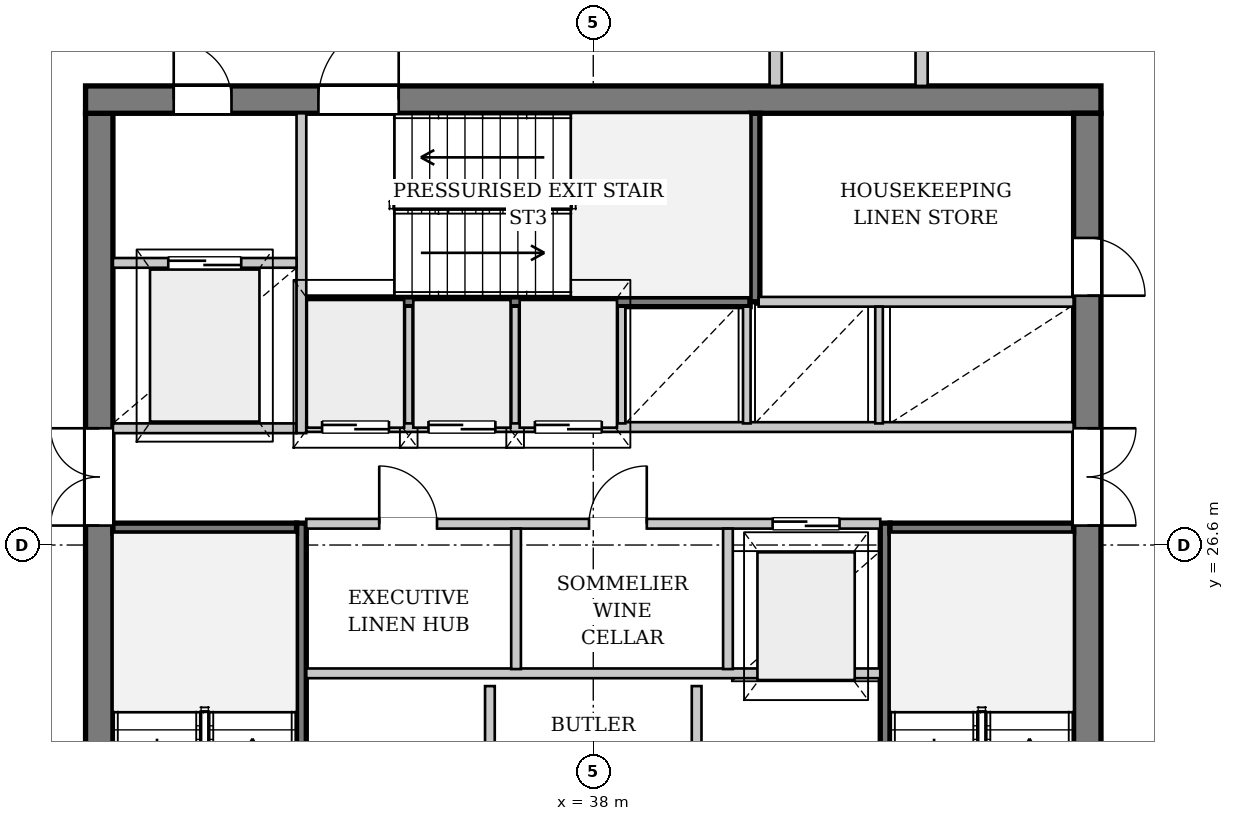
"""IFC4 building model, lengths in metres.
Left out: names, types, materials, properties, quantities, classifications, styles, units other than length and angle.
Written with IfcOpenShell. Run it as: python <this file> out.ifc"""

import sys

from ifc_helpers import new_model, si_unit, direction, frame, frame_2d, origin, place, context, subcontext, project, spatial, rectangle, extrude, source, transform, mapped, element, fill, save


model = new_model("IFC4")
c1 = context("Model", 3, precision=1e-05, world=origin(), true_north=direction((0.0, 1.0)))
c2 = subcontext(c1, "Body", "Model", "MODEL_VIEW")
j1 = project(units=[si_unit("LENGTHUNIT", "METRE"), si_unit("PLANEANGLEUNIT", "RADIAN")], contexts=[c1])
p1 = place(None, origin())
s1 = spatial("IfcSite", under=j1, at=p1, CompositionType="ELEMENT")
p2 = place(p1, origin())
s2 = spatial("IfcBuilding", under=s1, at=p2, CompositionType="ELEMENT")
p3 = place(p2, frame((0.0, 0.0, 220.25)))
s3 = spatial("IfcBuildingStorey", under=s2, at=p3, CompositionType="ELEMENT", Elevation=220.25)
p4 = place(p3, frame((52.95, 23.555, 0.0), z_axis=(0.0, 0.0, 1.0), x_axis=(-0.475160220621, -0.879899292385, 0.0)))
e1 = element("IfcWall", 1, at=p4, inside=s3, PredefinedType="SOLIDWALL", context=c2, shape_type="SweptSolid", body=[
    extrude(rectangle(XDim=23.072, YDim=0.32, at=frame_2d((11.536, 0.0))), origin(), (0.0, 0.0, 1.0), 2.822),
])
p5 = place(p4, frame((6.633, 0.0, 0.0)))
e2 = element("IfcOpeningElement", 2, at=p5, cuts=e1, PredefinedType="OPENING", context=c2, shape_type="SweptSolid", body=[
    extrude(rectangle(XDim=1.5, YDim=2.3, at=frame_2d((0.75, 1.15))), frame((0.0, 0.17, 0.0), z_axis=(0.0, -1.0, 0.0), x_axis=(1.0, 0.0, 0.0)), (0.0, 0.0, 1.0), 0.34),
])
p6 = place(p4, frame((15.773, 0.0, 0.352)))
e3 = element("IfcOpeningElement", 3, at=p6, cuts=e1, PredefinedType="OPENING", context=c2, shape_type="SweptSolid", body=[
    extrude(rectangle(XDim=2.6, YDim=2.35, at=frame_2d((1.3, 1.175))), frame((0.0, 0.17, 0.0), z_axis=(0.0, -1.0, 0.0), x_axis=(1.0, 0.0, 0.0)), (0.0, 0.0, 1.0), 0.34),
])
p7 = place(p3, frame((15.696, 32.1, 0.0), z_axis=(0.0, 0.0, 1.0), x_axis=(0.89709423073, 0.441839270766, 0.0)))
e4 = element("IfcWall", 4, at=p7, inside=s3, PredefinedType="SOLIDWALL", context=c2, shape_type="SweptSolid", body=[
    extrude(rectangle(XDim=22.511, YDim=0.38, at=frame_2d((11.255, 0.0))), origin(), (0.0, 0.0, 1.0), 2.822),
])
p8 = place(p7, frame((5.653, 0.0, 0.452)))
e5 = element("IfcOpeningElement", 5, at=p8, cuts=e4, PredefinedType="OPENING", context=c2, shape_type="SweptSolid", body=[
    extrude(rectangle(XDim=2.2, YDim=2.25, at=frame_2d((1.1, 1.125))), frame((0.0, 0.2, 0.0), z_axis=(0.0, -1.0, 0.0), x_axis=(1.0, 0.0, 0.0)), (0.0, 0.0, 1.0), 0.4),
])
p9 = place(p7, frame((15.108, 0.0, 0.452)))
e6 = element("IfcOpeningElement", 6, at=p9, cuts=e4, PredefinedType="OPENING", context=c2, shape_type="SweptSolid", body=[
    extrude(rectangle(XDim=2.2, YDim=2.25, at=frame_2d((1.1, 1.125))), frame((0.0, 0.2, 0.0), z_axis=(0.0, -1.0, 0.0), x_axis=(1.0, 0.0, 0.0)), (0.0, 0.0, 1.0), 0.4),
])
p10 = place(p3, frame((29.875, 19.5, 0.0), z_axis=(0.0, 0.0, 1.0), x_axis=(0.0, 1.0, 0.0)))
e7 = element("IfcWall", 7, at=p10, inside=s3, PredefinedType="SHEAR", context=c2, shape_type="SweptSolid", body=[
    extrude(rectangle(XDim=14.2, YDim=0.45, at=frame_2d((7.1, 0.0))), origin(), (0.0, 0.0, 1.0), 3.33),
])
p11 = place(p10, frame((7.42, 0.0, 0.0)))
e8 = element("IfcOpeningElement", 8, at=p11, cuts=e7, PredefinedType="OPENING", context=c2, shape_type="SweptSolid", body=[
    extrude(rectangle(XDim=1.6, YDim=2.2, at=frame_2d((0.8, 1.1))), frame((0.0, 0.235, 0.0), z_axis=(0.0, -1.0, 0.0), x_axis=(1.0, 0.0, 0.0)), (0.0, 0.0, 1.0), 0.47),
])
p12 = place(p3, frame((29.65, 33.925, 0.0), z_axis=(0.0, 0.0, 1.0), x_axis=(1.0, 0.0, 0.0)))
e9 = element("IfcWall", 9, at=p12, inside=s3, PredefinedType="SHEAR", context=c2, shape_type="SweptSolid", body=[
    extrude(rectangle(XDim=16.7, YDim=0.45, at=frame_2d((8.35, 0.0))), origin(), (0.0, 0.0, 1.0), 3.33),
])
p13 = place(p12, frame((1.45, 0.0, 0.0)))
e10 = element("IfcOpeningElement", 10, at=p13, cuts=e9, PredefinedType="OPENING", context=c2, shape_type="SweptSolid", body=[
    extrude(rectangle(XDim=0.95, YDim=2.1, at=frame_2d((0.475, 1.05))), frame((0.0, 0.235, 0.0), z_axis=(0.0, -1.0, 0.0), x_axis=(1.0, 0.0, 0.0)), (0.0, 0.0, 1.0), 0.47),
])
p14 = place(p12, frame((3.83, 0.0, 0.0)))
e11 = element("IfcOpeningElement", 11, at=p14, cuts=e9, PredefinedType="OPENING", context=c2, shape_type="SweptSolid", body=[
    extrude(rectangle(XDim=1.32, YDim=2.2, at=frame_2d((0.66, 1.1))), frame((0.0, 0.235, 0.0), z_axis=(0.0, -1.0, 0.0), x_axis=(1.0, 0.0, 0.0)), (0.0, 0.0, 1.0), 0.47),
])
p15 = place(p3, frame((46.125, 33.7, 0.0), z_axis=(0.0, 0.0, 1.0), x_axis=(0.0, -1.0, 0.0)))
e12 = element("IfcWall", 12, at=p15, inside=s3, PredefinedType="SHEAR", context=c2, shape_type="SweptSolid", body=[
    extrude(rectangle(XDim=14.2, YDim=0.45, at=frame_2d((7.1, 0.0))), origin(), (0.0, 0.0, 1.0), 3.33),
])
p16 = place(p15, frame((5.18, 0.0, 0.0)))
e13 = element("IfcOpeningElement", 13, at=p16, cuts=e12, PredefinedType="OPENING", context=c2, shape_type="SweptSolid", body=[
    extrude(rectangle(XDim=1.6, YDim=2.2, at=frame_2d((0.8, 1.1))), frame((0.0, 0.235, 0.0), z_axis=(0.0, -1.0, 0.0), x_axis=(1.0, 0.0, 0.0)), (0.0, 0.0, 1.0), 0.47),
])
p17 = place(p15, frame((2.05, 0.0, 0.0)))
e14 = element("IfcOpeningElement", 14, at=p17, cuts=e12, PredefinedType="OPENING", context=c2, shape_type="SweptSolid", body=[
    extrude(rectangle(XDim=0.95, YDim=2.1, at=frame_2d((0.475, 1.05))), frame((0.0, 0.235, 0.0), z_axis=(0.0, -1.0, 0.0), x_axis=(1.0, 0.0, 0.0)), (0.0, 0.0, 1.0), 0.47),
])
p18 = place(p3, frame((33.2, 19.5, 0.0), z_axis=(0.0, 0.0, 1.0), x_axis=(0.0, 1.0, 0.0)))
e15 = element("IfcWall", 15, at=p18, inside=s3, PredefinedType="PARTITIONING", context=c2, shape_type="SweptSolid", body=[
    extrude(rectangle(XDim=7.46, YDim=0.16, at=frame_2d((3.73, 0.0))), origin(), (0.0, 0.0, 1.0), 3.33),
])
p19 = place(p18, frame((0.08, 0.0, 0.0)))
e16 = element("IfcOpeningElement", 16, at=p19, cuts=e15, PredefinedType="OPENING", context=c2, shape_type="SweptSolid", body=[
    extrude(rectangle(XDim=1.32, YDim=2.2, at=frame_2d((0.66, 1.1))), frame((0.0, 0.09, 0.0), z_axis=(0.0, -1.0, 0.0), x_axis=(1.0, 0.0, 0.0)), (0.0, 0.0, 1.0), 0.18),
])
p20 = place(p3, frame((30.1, 26.88, 0.0), z_axis=(0.0, 0.0, 1.0), x_axis=(1.0, 0.0, 0.0)))
e17 = element("IfcWall", 17, at=p20, inside=s3, PredefinedType="PARTITIONING", context=c2, shape_type="SweptSolid", body=[
    extrude(rectangle(XDim=3.02, YDim=0.16, at=frame_2d((1.51, 0.0))), origin(), (0.0, 0.0, 1.0), 3.33),
])
p21 = place(p3, frame((42.8, 26.96, 0.0), z_axis=(0.0, 0.0, 1.0), x_axis=(0.0, -1.0, 0.0)))
e18 = element("IfcWall", 18, at=p21, inside=s3, PredefinedType="PARTITIONING", context=c2, shape_type="SweptSolid", body=[
    extrude(rectangle(XDim=7.46, YDim=0.16, at=frame_2d((3.73, 0.0))), origin(), (0.0, 0.0, 1.0), 3.33),
])
p22 = place(p21, frame((6.06, 0.0, 0.0)))
e19 = element("IfcOpeningElement", 19, at=p22, cuts=e18, PredefinedType="OPENING", context=c2, shape_type="SweptSolid", body=[
    extrude(rectangle(XDim=1.32, YDim=2.2, at=frame_2d((0.66, 1.1))), frame((0.0, 0.09, 0.0), z_axis=(0.0, -1.0, 0.0), x_axis=(1.0, 0.0, 0.0)), (0.0, 0.0, 1.0), 0.18),
])
p23 = place(p3, frame((42.88, 26.88, 0.0), z_axis=(0.0, 0.0, 1.0), x_axis=(1.0, 0.0, 0.0)))
e20 = element("IfcWall", 20, at=p23, inside=s3, PredefinedType="PARTITIONING", context=c2, shape_type="SweptSolid", body=[
    extrude(rectangle(XDim=3.02, YDim=0.16, at=frame_2d((1.51, 0.0))), origin(), (0.0, 0.0, 1.0), 3.33),
])
p24 = place(p3, frame((33.28, 30.6, 0.0), z_axis=(0.0, 0.0, 1.0), x_axis=(1.0, 0.0, 0.0)))
e21 = element("IfcWall", 21, at=p24, inside=s3, PredefinedType="PARTITIONING", context=c2, shape_type="SweptSolid", body=[
    extrude(rectangle(XDim=7.3, YDim=0.16, at=frame_2d((3.65, 0.0))), origin(), (0.0, 0.0, 1.0), 3.33),
])
p25 = place(p3, frame((40.66, 30.6, 0.0), z_axis=(0.0, 0.0, 1.0), x_axis=(0.0, 1.0, 0.0)))
e22 = element("IfcWall", 22, at=p25, inside=s3, PredefinedType="PARTITIONING", context=c2, shape_type="SweptSolid", body=[
    extrude(rectangle(XDim=3.1, YDim=0.16, at=frame_2d((1.55, 0.0))), origin(), (0.0, 0.0, 1.0), 3.33),
])
p26 = place(p3, frame((36.3, 19.5, 0.0), z_axis=(0.0, 0.0, 1.0), x_axis=(0.0, 1.0, 0.0)))
e23 = element("IfcWall", 23, at=p26, inside=s3, PredefinedType="PARTITIONING", context=c2, shape_type="SweptSolid", body=[
    extrude(rectangle(XDim=4.78, YDim=0.16, at=frame_2d((2.39, 0.0))), origin(), (0.0, 0.0, 1.0), 3.33),
])
p27 = place(p26, frame((0.6, 0.0, 0.0)))
e24 = element("IfcOpeningElement", 24, at=p27, cuts=e23, PredefinedType="OPENING", context=c2, shape_type="SweptSolid", body=[
    extrude(rectangle(XDim=1.2, YDim=2.2, at=frame_2d((0.6, 1.1))), frame((0.0, 0.09, 0.0), z_axis=(0.0, -1.0, 0.0), x_axis=(1.0, 0.0, 0.0)), (0.0, 0.0, 1.0), 0.18),
])
p28 = place(p26, frame((2.65, 0.0, 0.0)))
e25 = element("IfcOpeningElement", 25, at=p28, cuts=e23, PredefinedType="OPENING", context=c2, shape_type="SweptSolid", body=[
    extrude(rectangle(XDim=0.95, YDim=2.1, at=frame_2d((0.475, 1.05))), frame((0.0, 0.09, 0.0), z_axis=(0.0, -1.0, 0.0), x_axis=(1.0, 0.0, 0.0)), (0.0, 0.0, 1.0), 0.18),
])
p29 = place(p3, frame((39.7, 24.28, 0.0), z_axis=(0.0, 0.0, 1.0), x_axis=(0.0, -1.0, 0.0)))
e26 = element("IfcWall", 26, at=p29, inside=s3, PredefinedType="PARTITIONING", context=c2, shape_type="SweptSolid", body=[
    extrude(rectangle(XDim=4.78, YDim=0.16, at=frame_2d((2.39, 0.0))), origin(), (0.0, 0.0, 1.0), 3.33),
])
p30 = place(p29, frame((3.12, 0.0, 0.0)))
e27 = element("IfcOpeningElement", 27, at=p30, cuts=e26, PredefinedType="OPENING", context=c2, shape_type="SweptSolid", body=[
    extrude(rectangle(XDim=1.2, YDim=2.2, at=frame_2d((0.6, 1.1))), frame((0.0, 0.09, 0.0), z_axis=(0.0, -1.0, 0.0), x_axis=(1.0, 0.0, 0.0)), (0.0, 0.0, 1.0), 0.18),
])
p31 = place(p3, frame((33.28, 24.49, 0.0), z_axis=(0.0, 0.0, 1.0), x_axis=(1.0, 0.0, 0.0)))
e28 = element("IfcWall", 28, at=p31, inside=s3, PredefinedType="PARTITIONING", context=c2, shape_type="SweptSolid", body=[
    extrude(rectangle(XDim=9.44, YDim=0.16, at=frame_2d((4.72, 0.0))), origin(), (0.0, 0.0, 1.0), 3.33),
])
p32 = place(p3, frame((30.1, 28.52, 0.0), z_axis=(0.0, 0.0, 1.0), x_axis=(1.0, 0.0, 0.0)))
e29 = element("IfcWall", 29, at=p32, inside=s3, PredefinedType="PARTITIONING", context=c2, shape_type="SweptSolid", body=[
    extrude(rectangle(XDim=3.02, YDim=0.16, at=frame_2d((1.51, 0.0))), origin(), (0.0, 0.0, 1.0), 3.33),
])
p33 = place(p3, frame((33.2, 28.44, 0.0), z_axis=(0.0, 0.0, 1.0), x_axis=(0.0, 1.0, 0.0)))
e30 = element("IfcWall", 30, at=p33, inside=s3, PredefinedType="PARTITIONING", context=c2, shape_type="SweptSolid", body=[
    extrude(rectangle(XDim=5.26, YDim=0.16, at=frame_2d((2.63, 0.0))), origin(), (0.0, 0.0, 1.0), 3.33),
])
p34 = place(p3, frame((30.1, 31.24, 0.0), z_axis=(0.0, 0.0, 1.0), x_axis=(1.0, 0.0, 0.0)))
e31 = element("IfcWall", 31, at=p34, inside=s3, PredefinedType="PARTITIONING", context=c2, shape_type="SweptSolid", body=[
    extrude(rectangle(XDim=3.02, YDim=0.16, at=frame_2d((1.51, 0.0))), origin(), (0.0, 0.0, 1.0), 3.33),
])
p35 = place(p34, frame((0.91, 0.0, 0.0)))
e32 = element("IfcOpeningElement", 32, at=p35, cuts=e31, PredefinedType="OPENING", context=c2, shape_type="SweptSolid", body=[
    extrude(rectangle(XDim=1.2, YDim=2.2, at=frame_2d((0.6, 1.1))), frame((0.0, 0.09, 0.0), z_axis=(0.0, -1.0, 0.0), x_axis=(1.0, 0.0, 0.0)), (0.0, 0.0, 1.0), 0.18),
])
p36 = place(p3, frame((33.28, 26.95, 0.0), z_axis=(0.0, 0.0, 1.0), x_axis=(1.0, 0.0, 0.0)))
e33 = element("IfcWall", 33, at=p36, inside=s3, PredefinedType="PARTITIONING", context=c2, shape_type="SweptSolid", body=[
    extrude(rectangle(XDim=9.44, YDim=0.16, at=frame_2d((4.72, 0.0))), origin(), (0.0, 0.0, 1.0), 3.33),
])
p37 = place(p36, frame((1.2, 0.0, 0.0)))
e34 = element("IfcOpeningElement", 34, at=p37, cuts=e33, PredefinedType="OPENING", context=c2, shape_type="SweptSolid", body=[
    extrude(rectangle(XDim=0.95, YDim=2.1, at=frame_2d((0.475, 1.05))), frame((0.0, 0.09, 0.0), z_axis=(0.0, -1.0, 0.0), x_axis=(1.0, 0.0, 0.0)), (0.0, 0.0, 1.0), 0.18),
])
p38 = place(p36, frame((4.65, 0.0, 0.0)))
e35 = element("IfcOpeningElement", 35, at=p38, cuts=e33, PredefinedType="OPENING", context=c2, shape_type="SweptSolid", body=[
    extrude(rectangle(XDim=0.95, YDim=2.1, at=frame_2d((0.475, 1.05))), frame((0.0, 0.09, 0.0), z_axis=(0.0, -1.0, 0.0), x_axis=(1.0, 0.0, 0.0)), (0.0, 0.0, 1.0), 0.18),
])
p39 = place(p36, frame((7.67, 0.0, 0.0)))
e36 = element("IfcOpeningElement", 36, at=p39, cuts=e33, PredefinedType="OPENING", context=c2, shape_type="SweptSolid", body=[
    extrude(rectangle(XDim=1.1, YDim=2.2, at=frame_2d((0.55, 1.1))), frame((0.0, 0.09, 0.0), z_axis=(0.0, -1.0, 0.0), x_axis=(1.0, 0.0, 0.0)), (0.0, 0.0, 1.0), 0.18),
])
for number, where, z_axis, x_axis in (
    (37, (36.73, 24.56, 0.0), (0.0, 0.0, 1.0), (0.0, 1.0, 0.0)),
    (38, (40.215, 24.56, 0.0), (0.0, 0.0, 1.0), (0.0, 1.0, 0.0)),
):
    element("IfcWall", number, at=place(p3, frame(where, z_axis=z_axis, x_axis=x_axis)), inside=s3, PredefinedType="PARTITIONING", context=c2, shape_type="SweptSolid", body=[
        extrude(rectangle(XDim=2.31, YDim=0.16, at=frame_2d((1.155, 0.0))), origin(), (0.0, 0.0, 1.0), 3.33),
    ])
p40 = place(p3, frame((33.28, 28.54, 0.0), z_axis=(0.0, 0.0, 1.0), x_axis=(1.0, 0.0, 0.0)))
e39 = element("IfcWall", 39, at=p40, inside=s3, PredefinedType="PARTITIONING", context=c2, shape_type="SweptSolid", body=[
    extrude(rectangle(XDim=12.62, YDim=0.16, at=frame_2d((6.31, 0.0))), origin(), (0.0, 0.0, 1.0), 3.33),
])
p41 = place(p40, frame((0.26, 0.0, 0.0)))
e40 = element("IfcOpeningElement", 40, at=p41, cuts=e39, PredefinedType="OPENING", context=c2, shape_type="SweptSolid", body=[
    extrude(rectangle(XDim=1.1, YDim=2.2, at=frame_2d((0.55, 1.1))), frame((0.0, 0.09, 0.0), z_axis=(0.0, -1.0, 0.0), x_axis=(1.0, 0.0, 0.0)), (0.0, 0.0, 1.0), 0.18),
])
p42 = place(p40, frame((2.01, 0.0, 0.0)))
e41 = element("IfcOpeningElement", 41, at=p42, cuts=e39, PredefinedType="OPENING", context=c2, shape_type="SweptSolid", body=[
    extrude(rectangle(XDim=1.1, YDim=2.2, at=frame_2d((0.55, 1.1))), frame((0.0, 0.09, 0.0), z_axis=(0.0, -1.0, 0.0), x_axis=(1.0, 0.0, 0.0)), (0.0, 0.0, 1.0), 0.18),
])
p43 = place(p40, frame((3.76, 0.0, 0.0)))
e42 = element("IfcOpeningElement", 42, at=p43, cuts=e39, PredefinedType="OPENING", context=c2, shape_type="SweptSolid", body=[
    extrude(rectangle(XDim=1.1, YDim=2.2, at=frame_2d((0.55, 1.1))), frame((0.0, 0.09, 0.0), z_axis=(0.0, -1.0, 0.0), x_axis=(1.0, 0.0, 0.0)), (0.0, 0.0, 1.0), 0.18),
])
p44 = place(p3, frame((40.72, 30.6, 0.0), z_axis=(0.0, 0.0, 1.0), x_axis=(1.0, 0.0, 0.0)))
e43 = element("IfcWall", 43, at=p44, inside=s3, PredefinedType="PARTITIONING", context=c2, shape_type="SweptSolid", body=[
    extrude(rectangle(XDim=5.18, YDim=0.16, at=frame_2d((2.59, 0.0))), origin(), (0.0, 0.0, 1.0), 3.33),
])
for number, where, z_axis, x_axis in (
    (44, (34.965, 28.6, 0.0), (0.0, 0.0, 1.0), (0.0, 1.0, 0.0)),
    (45, (36.715, 28.6, 0.0), (0.0, 0.0, 1.0), (0.0, 1.0, 0.0)),
    (46, (38.465, 28.6, 0.0), (0.0, 0.0, 1.0), (0.0, 1.0, 0.0)),
    (47, (40.525, 28.6, 0.0), (0.0, 0.0, 1.0), (0.0, 1.0, 0.0)),
    (48, (42.7, 28.6, 0.0), (0.0, 0.0, 1.0), (0.0, 1.0, 0.0)),
):
    element("IfcWall", number, at=place(p3, frame(where, z_axis=z_axis, x_axis=x_axis)), inside=s3, PredefinedType="PARTITIONING", context=c2, shape_type="SweptSolid", body=[
        extrude(rectangle(XDim=1.92, YDim=0.125, at=frame_2d((0.96, 0.0))), origin(), (0.0, 0.0, 1.0), 3.33),
    ])
for number, where, z_axis, x_axis in (
    (49, (41.0, 34.15, 0.0), (0.0, 0.0, 1.0), (0.0, 1.0, 0.0)),
    (50, (43.4, 34.15, 0.0), (0.0, 0.0, 1.0), (0.0, 1.0, 0.0)),
):
    element("IfcWall", number, at=place(p3, frame(where, z_axis=z_axis, x_axis=x_axis)), inside=s3, PredefinedType="PARTITIONING", context=c2, shape_type="SweptSolid", body=[
        extrude(rectangle(XDim=1.85, YDim=0.2, at=frame_2d((0.925, 0.0))), origin(), (0.0, 0.0, 1.0), 3.33),
    ])
m1 = source(origin(), c2, "Body", "SweptSolid", [
    extrude(rectangle(XDim=1.6, YDim=2.2, at=frame_2d((0.8, 1.1))), frame((0.0, 0.025, 0.0), z_axis=(0.0, -1.0, 0.0), x_axis=(1.0, 0.0, 0.0)), (0.0, 0.0, 1.0), 0.05),
])
p45 = place(p11, origin())
e51 = element("IfcDoor", 51, at=p45, inside=s3, OperationType="DOUBLE_DOOR_SINGLE_SWING", PredefinedType="DOOR", context=c2, shape_type="MappedRepresentation", body=[
    mapped(m1, transform((0.0, 0.0, 0.0), x_axis=(1.0, 0.0, 0.0), y_axis=(0.0, 1.0, 0.0), z_axis=(0.0, 0.0, 1.0), scale=1.0)),
])
fill(e8, e51)
m2 = source(origin(), c2, "Body", "SweptSolid", [
    extrude(rectangle(XDim=0.95, YDim=2.1, at=frame_2d((0.475, 1.05))), frame((0.0, 0.025, 0.0), z_axis=(0.0, -1.0, 0.0), x_axis=(1.0, 0.0, 0.0)), (0.0, 0.0, 1.0), 0.05),
])
p46 = place(p13, origin())
e52 = element("IfcDoor", 52, at=p46, inside=s3, OperationType="SINGLE_SWING_LEFT", PredefinedType="DOOR", context=c2, shape_type="MappedRepresentation", body=[
    mapped(m2, transform((0.0, 0.0, 0.0), x_axis=(1.0, 0.0, 0.0), y_axis=(0.0, 1.0, 0.0), z_axis=(0.0, 0.0, 1.0), scale=1.0)),
])
fill(e10, e52)
m3 = source(origin(), c2, "Body", "SweptSolid", [
    extrude(rectangle(XDim=1.32, YDim=2.2, at=frame_2d((0.66, 1.1))), frame((0.0, 0.025, 0.0), z_axis=(0.0, -1.0, 0.0), x_axis=(1.0, 0.0, 0.0)), (0.0, 0.0, 1.0), 0.05),
])
p47 = place(p14, origin())
e53 = element("IfcDoor", 53, at=p47, inside=s3, OperationType="SINGLE_SWING_RIGHT", PredefinedType="DOOR", context=c2, shape_type="MappedRepresentation", body=[
    mapped(m3, transform((0.0, 0.0, 0.0), x_axis=(1.0, 0.0, 0.0), y_axis=(0.0, 1.0, 0.0), z_axis=(0.0, 0.0, 1.0), scale=1.0)),
])
fill(e11, e53)
p48 = place(p16, origin())
e54 = element("IfcDoor", 54, at=p48, inside=s3, OperationType="DOUBLE_DOOR_SINGLE_SWING", PredefinedType="DOOR", context=c2, shape_type="MappedRepresentation", body=[
    mapped(m1, transform((0.0, 0.0, 0.0), x_axis=(1.0, 0.0, 0.0), y_axis=(0.0, 1.0, 0.0), z_axis=(0.0, 0.0, 1.0), scale=1.0)),
])
fill(e13, e54)
m4 = source(origin(), c2, "Body", "SweptSolid", [
    extrude(rectangle(XDim=1.2, YDim=2.2, at=frame_2d((0.6, 1.1))), frame((0.0, 0.025, 0.0), z_axis=(0.0, -1.0, 0.0), x_axis=(1.0, 0.0, 0.0)), (0.0, 0.0, 1.0), 0.05),
])
p49 = place(p35, origin())
e55 = element("IfcDoor", 55, at=p49, inside=s3, OperationType="DOUBLE_DOOR_SLIDING", PredefinedType="DOOR", context=c2, shape_type="MappedRepresentation", body=[
    mapped(m4, transform((0.0, 0.0, 0.0), x_axis=(1.0, 0.0, 0.0), y_axis=(0.0, 1.0, 0.0), z_axis=(0.0, 0.0, 1.0), scale=1.0)),
])
fill(e32, e55)
p50 = place(p37, origin())
e56 = element("IfcDoor", 56, at=p50, inside=s3, OperationType="SINGLE_SWING_LEFT", PredefinedType="DOOR", context=c2, shape_type="MappedRepresentation", body=[
    mapped(m2, transform((0.0, 0.0, 0.0), x_axis=(1.0, 0.0, 0.0), y_axis=(0.0, 1.0, 0.0), z_axis=(0.0, 0.0, 1.0), scale=1.0)),
])
fill(e34, e56)
p51 = place(p38, origin())
e57 = element("IfcDoor", 57, at=p51, inside=s3, OperationType="SINGLE_SWING_RIGHT", PredefinedType="DOOR", context=c2, shape_type="MappedRepresentation", body=[
    mapped(m2, transform((0.0, 0.0, 0.0), x_axis=(1.0, 0.0, 0.0), y_axis=(0.0, 1.0, 0.0), z_axis=(0.0, 0.0, 1.0), scale=1.0)),
])
fill(e35, e57)
m5 = source(origin(), c2, "Body", "SweptSolid", [
    extrude(rectangle(XDim=1.1, YDim=2.2, at=frame_2d((0.55, 1.1))), frame((0.0, 0.025, 0.0), z_axis=(0.0, -1.0, 0.0), x_axis=(1.0, 0.0, 0.0)), (0.0, 0.0, 1.0), 0.05),
])
p52 = place(p39, origin())
e58 = element("IfcDoor", 58, at=p52, inside=s3, OperationType="DOUBLE_DOOR_SLIDING", PredefinedType="DOOR", context=c2, shape_type="MappedRepresentation", body=[
    mapped(m5, transform((0.0, 0.0, 0.0), x_axis=(1.0, 0.0, 0.0), y_axis=(0.0, 1.0, 0.0), z_axis=(0.0, 0.0, 1.0), scale=1.0)),
])
fill(e36, e58)
p53 = place(p41, origin())
e59 = element("IfcDoor", 59, at=p53, inside=s3, OperationType="DOUBLE_DOOR_SLIDING", PredefinedType="DOOR", context=c2, shape_type="MappedRepresentation", body=[
    mapped(m5, transform((0.0, 0.0, 0.0), x_axis=(1.0, 0.0, 0.0), y_axis=(0.0, 1.0, 0.0), z_axis=(0.0, 0.0, 1.0), scale=1.0)),
])
fill(e40, e59)
p54 = place(p42, origin())
e60 = element("IfcDoor", 60, at=p54, inside=s3, OperationType="DOUBLE_DOOR_SLIDING", PredefinedType="DOOR", context=c2, shape_type="MappedRepresentation", body=[
    mapped(m5, transform((0.0, 0.0, 0.0), x_axis=(1.0, 0.0, 0.0), y_axis=(0.0, 1.0, 0.0), z_axis=(0.0, 0.0, 1.0), scale=1.0)),
])
fill(e41, e60)
p55 = place(p43, origin())
e61 = element("IfcDoor", 61, at=p55, inside=s3, OperationType="DOUBLE_DOOR_SLIDING", PredefinedType="DOOR", context=c2, shape_type="MappedRepresentation", body=[
    mapped(m5, transform((0.0, 0.0, 0.0), x_axis=(1.0, 0.0, 0.0), y_axis=(0.0, 1.0, 0.0), z_axis=(0.0, 0.0, 1.0), scale=1.0)),
])
fill(e42, e61)
p56 = place(p17, origin())
e62 = element("IfcDoor", 62, at=p56, inside=s3, OperationType="SINGLE_SWING_RIGHT", PredefinedType="DOOR", context=c2, shape_type="MappedRepresentation", body=[
    mapped(m2, transform((0.0, 0.0, 0.0), x_axis=(1.0, 0.0, 0.0), y_axis=(0.0, 1.0, 0.0), z_axis=(0.0, 0.0, 1.0), scale=1.0)),
])
fill(e14, e62)
save(model, sys.argv[1])
